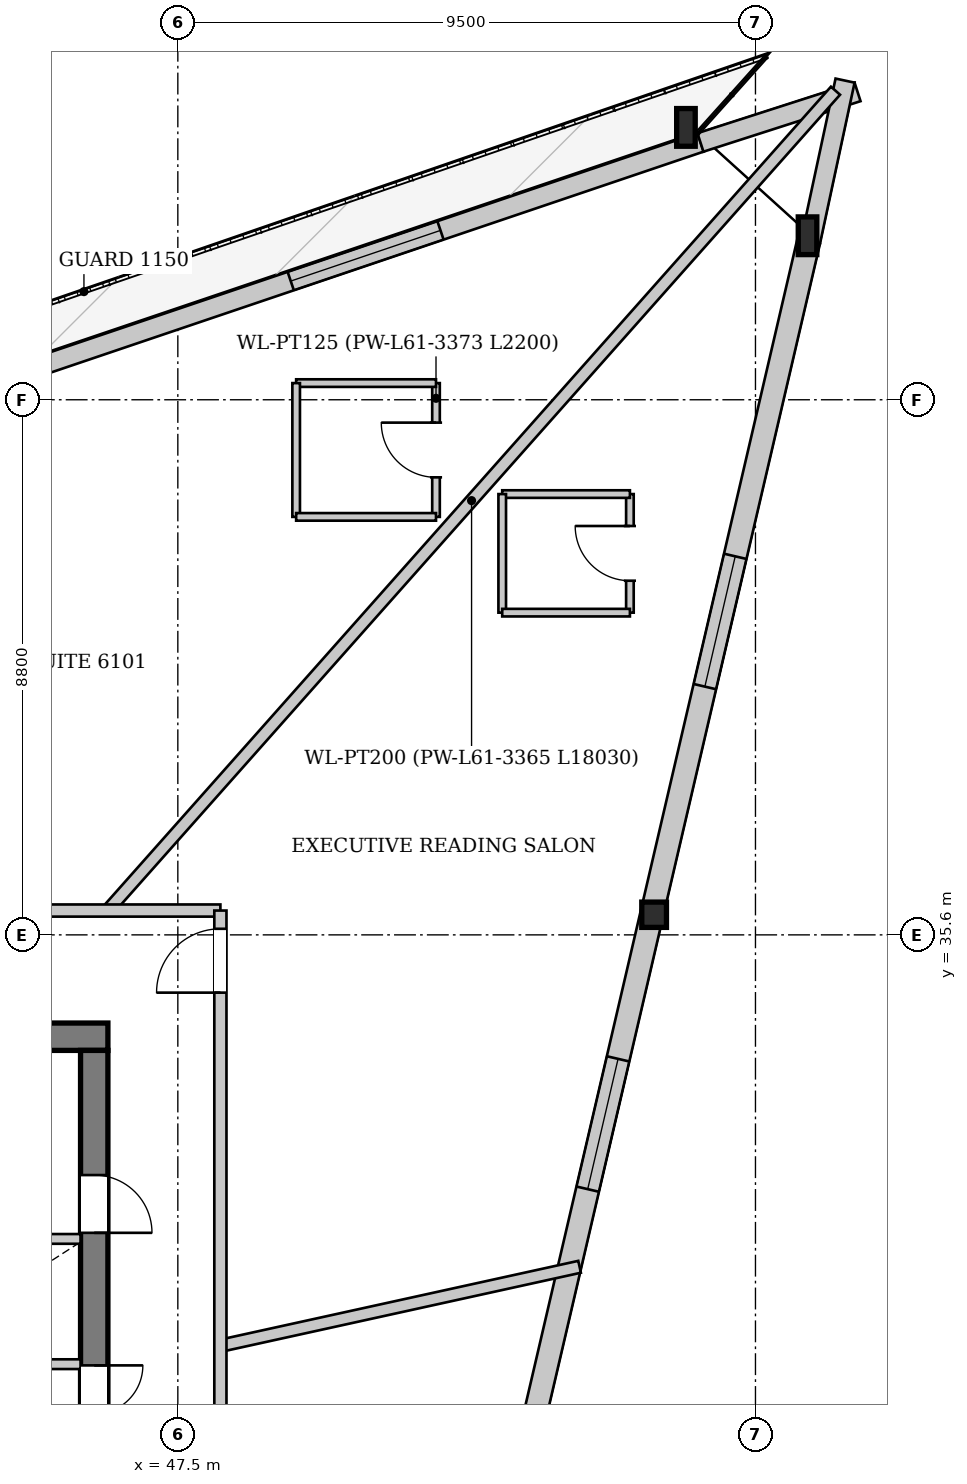
"""IFC4 building model, lengths in metres.
Left out: names, types, materials, properties, quantities, classifications, styles, units other than length and angle.
Written with IfcOpenShell. Run it as: python <this file> out.ifc"""

import sys

from ifc_helpers import new_model, si_unit, direction, frame, frame_2d, origin, origin_2d, place, context, subcontext, project, spatial, rectangle, i_section, extrude, source, transform, mapped, element, fill, save


model = new_model("IFC4")
c1 = context("Model", 3, precision=1e-05, world=origin(), true_north=direction((0.0, 1.0)))
c2 = subcontext(c1, "Body", "Model", "MODEL_VIEW")
j1 = project(units=[si_unit("LENGTHUNIT", "METRE"), si_unit("PLANEANGLEUNIT", "RADIAN")], contexts=[c1])
p1 = place(None, origin())
s1 = spatial("IfcSite", under=j1, at=p1, CompositionType="ELEMENT")
p2 = place(p1, origin())
s2 = spatial("IfcBuilding", under=s1, at=p2, CompositionType="ELEMENT")
p3 = place(p2, frame((0.0, 0.0, 230.9)))
s3 = spatial("IfcBuildingStorey", under=s2, at=p3, CompositionType="ELEMENT", Elevation=230.9)
m1 = source(origin(), c2, "Body", "SweptSolid", [
    extrude(i_section(OverallWidth=0.305, OverallDepth=0.62, WebThickness=0.021, FlangeThickness=0.04, at=origin_2d()), origin(), (0.0, 0.0, 1.0), 3.47),
])
p4 = place(p3, frame((58.06, 46.961, 0.0), z_axis=(-0.117364168692, 0.078313141339, 0.989996315044), x_axis=(-0.555045397528, -0.831820056673, 0.0)))
e1 = element("IfcColumn", 1, at=p4, inside=s3, PredefinedType="COLUMN", context=c2, shape_type="MappedRepresentation", body=[
    mapped(m1, transform((0.0, 0.0, 0.0), x_axis=(1.0, 0.0, 0.0), y_axis=(0.0, 1.0, 0.0), z_axis=(0.0, 0.0, 1.0), scale=1.0)),
])
m2 = source(origin(), c2, "Body", "SweptSolid", [
    extrude(i_section(OverallWidth=0.305, OverallDepth=0.62, WebThickness=0.021, FlangeThickness=0.04, at=origin_2d()), origin(), (0.0, 0.0, 1.0), 3.461),
])
p5 = place(p3, frame((56.046, 48.784, 0.0), z_axis=(-0.109545504942, 0.054808021468, 0.992469577937), x_axis=(-0.447443925033, -0.894311989158, 0.0)))
e2 = element("IfcColumn", 2, at=p5, inside=s3, PredefinedType="COLUMN", context=c2, shape_type="MappedRepresentation", body=[
    mapped(m2, transform((0.0, 0.0, 0.0), x_axis=(1.0, 0.0, 0.0), y_axis=(0.0, 1.0, 0.0), z_axis=(0.0, 0.0, 1.0), scale=1.0)),
])
m3 = source(origin(), c2, "Body", "SweptSolid", [
    extrude(i_section(OverallWidth=0.406, OverallDepth=0.416, WebThickness=0.027, FlangeThickness=0.042, at=origin_2d()), origin(), (0.0, 0.0, 1.0), 3.454),
])
p6 = place(p3, frame((55.457, 35.799, 0.0), z_axis=(-0.071883783203, 0.076195396552, 0.994498357594), x_axis=(-0.727387297644, -0.686227162991, 0.0)))
e3 = element("IfcColumn", 3, at=p6, inside=s3, PredefinedType="COLUMN", context=c2, shape_type="MappedRepresentation", body=[
    mapped(m3, transform((0.0, 0.0, 0.0), x_axis=(1.0, 0.0, 0.0), y_axis=(0.0, 1.0, 0.0), z_axis=(0.0, 0.0, 1.0), scale=1.0)),
])
p7 = place(p3, frame((34.909, 41.462, 0.0), z_axis=(0.0, 0.0, 1.0), x_axis=(0.947234987264, 0.320539980193, 0.0)))
e4 = element("IfcWall", 4, at=p7, inside=s3, PredefinedType="SOLIDWALL", context=c2, shape_type="SweptSolid", body=[
    extrude(rectangle(XDim=22.369, YDim=0.32, at=frame_2d((11.185, 0.0))), origin(), (0.0, 0.0, 1.0), 2.872),
])
p8 = place(p7, frame((6.408, 0.0, 0.0)))
e5 = element("IfcOpeningElement", 5, at=p8, cuts=e4, PredefinedType="OPENING", context=c2, shape_type="SweptSolid", body=[
    extrude(rectangle(XDim=1.5, YDim=2.3, at=frame_2d((0.75, 1.15))), frame((0.0, 0.17, 0.0), z_axis=(0.0, -1.0, 0.0), x_axis=(1.0, 0.0, 0.0)), (0.0, 0.0, 1.0), 0.34),
])
p9 = place(p7, frame((15.253, 0.0, 0.402)))
e6 = element("IfcOpeningElement", 6, at=p9, cuts=e4, PredefinedType="OPENING", context=c2, shape_type="SweptSolid", body=[
    extrude(rectangle(XDim=2.6, YDim=2.35, at=frame_2d((1.3, 1.175))), frame((0.0, 0.17, 0.0), z_axis=(0.0, -1.0, 0.0), x_axis=(1.0, 0.0, 0.0)), (0.0, 0.0, 1.0), 0.34),
])
p10 = place(p3, frame((56.095, 48.632, 0.0), z_axis=(0.0, 0.0, 1.0), x_axis=(0.951993925108, 0.306116916483, 0.0)))
e7 = element("IfcWall", 7, at=p10, inside=s3, PredefinedType="SOLIDWALL", context=c2, shape_type="SweptSolid", body=[
    extrude(rectangle(XDim=2.714, YDim=0.32, at=frame_2d((1.357, 0.0))), origin(), (0.0, 0.0, 1.0), 2.872),
])
p11 = place(p3, frame((58.474, 49.649, 0.0), z_axis=(0.0, 0.0, 1.0), x_axis=(-0.210020466506, -0.97769698969, 0.0)))
e8 = element("IfcWall", 8, at=p11, inside=s3, PredefinedType="SOLIDWALL", context=c2, shape_type="SweptSolid", body=[
    extrude(rectangle(XDim=2.714, YDim=0.32, at=frame_2d((1.357, 0.0))), origin(), (0.0, 0.0, 1.0), 2.872),
])
p12 = place(p3, frame((57.875, 47.004, 0.0), z_axis=(0.0, 0.0, 1.0), x_axis=(-0.227070358906, -0.973878355908, 0.0)))
e9 = element("IfcWall", 9, at=p12, inside=s3, PredefinedType="SOLIDWALL", context=c2, shape_type="SweptSolid", body=[
    extrude(rectangle(XDim=22.923, YDim=0.38, at=frame_2d((11.461, 0.0))), origin(), (0.0, 0.0, 1.0), 2.872),
])
p13 = place(p12, frame((5.318, 0.0, 0.502)))
e10 = element("IfcOpeningElement", 10, at=p13, cuts=e9, PredefinedType="OPENING", context=c2, shape_type="SweptSolid", body=[
    extrude(rectangle(XDim=2.2, YDim=2.25, at=frame_2d((1.1, 1.125))), frame((0.0, 0.2, 0.0), z_axis=(0.0, -1.0, 0.0), x_axis=(1.0, 0.0, 0.0)), (0.0, 0.0, 1.0), 0.4),
])
p14 = place(p12, frame((13.804, 0.0, 0.502)))
e11 = element("IfcOpeningElement", 11, at=p14, cuts=e9, PredefinedType="OPENING", context=c2, shape_type="SweptSolid", body=[
    extrude(rectangle(XDim=2.2, YDim=2.25, at=frame_2d((1.1, 1.125))), frame((0.0, 0.2, 0.0), z_axis=(0.0, -1.0, 0.0), x_axis=(1.0, 0.0, 0.0)), (0.0, 0.0, 1.0), 0.4),
])
p15 = place(p3, frame((29.65, 33.925, 0.0), z_axis=(0.0, 0.0, 1.0), x_axis=(1.0, 0.0, 0.0)))
e12 = element("IfcWall", 12, at=p15, inside=s3, PredefinedType="SHEAR", context=c2, shape_type="SweptSolid", body=[
    extrude(rectangle(XDim=16.7, YDim=0.45, at=frame_2d((8.35, 0.0))), origin(), (0.0, 0.0, 1.0), 3.38),
])
p16 = place(p15, frame((1.45, 0.0, 0.0)))
e13 = element("IfcOpeningElement", 13, at=p16, cuts=e12, PredefinedType="OPENING", context=c2, shape_type="SweptSolid", body=[
    extrude(rectangle(XDim=0.95, YDim=2.1, at=frame_2d((0.475, 1.05))), frame((0.0, 0.235, 0.0), z_axis=(0.0, -1.0, 0.0), x_axis=(1.0, 0.0, 0.0)), (0.0, 0.0, 1.0), 0.47),
])
p17 = place(p15, frame((3.83, 0.0, 0.0)))
e14 = element("IfcOpeningElement", 14, at=p17, cuts=e12, PredefinedType="OPENING", context=c2, shape_type="SweptSolid", body=[
    extrude(rectangle(XDim=1.32, YDim=2.2, at=frame_2d((0.66, 1.1))), frame((0.0, 0.235, 0.0), z_axis=(0.0, -1.0, 0.0), x_axis=(1.0, 0.0, 0.0)), (0.0, 0.0, 1.0), 0.47),
])
p18 = place(p3, frame((46.125, 33.7, 0.0), z_axis=(0.0, 0.0, 1.0), x_axis=(0.0, -1.0, 0.0)))
e15 = element("IfcWall", 15, at=p18, inside=s3, PredefinedType="SHEAR", context=c2, shape_type="SweptSolid", body=[
    extrude(rectangle(XDim=14.2, YDim=0.45, at=frame_2d((7.1, 0.0))), origin(), (0.0, 0.0, 1.0), 3.38),
])
p19 = place(p18, frame((5.18, 0.0, 0.0)))
e16 = element("IfcOpeningElement", 16, at=p19, cuts=e15, PredefinedType="OPENING", context=c2, shape_type="SweptSolid", body=[
    extrude(rectangle(XDim=1.6, YDim=2.2, at=frame_2d((0.8, 1.1))), frame((0.0, 0.235, 0.0), z_axis=(0.0, -1.0, 0.0), x_axis=(1.0, 0.0, 0.0)), (0.0, 0.0, 1.0), 0.47),
])
p20 = place(p18, frame((2.05, 0.0, 0.0)))
e17 = element("IfcOpeningElement", 17, at=p20, cuts=e15, PredefinedType="OPENING", context=c2, shape_type="SweptSolid", body=[
    extrude(rectangle(XDim=0.95, YDim=2.1, at=frame_2d((0.475, 1.05))), frame((0.0, 0.235, 0.0), z_axis=(0.0, -1.0, 0.0), x_axis=(1.0, 0.0, 0.0)), (0.0, 0.0, 1.0), 0.47),
])
p21 = place(p3, frame((33.28, 28.54, 0.0), z_axis=(0.0, 0.0, 1.0), x_axis=(1.0, 0.0, 0.0)))
e18 = element("IfcWall", 18, at=p21, inside=s3, PredefinedType="PARTITIONING", context=c2, shape_type="SweptSolid", body=[
    extrude(rectangle(XDim=12.62, YDim=0.16, at=frame_2d((6.31, 0.0))), origin(), (0.0, 0.0, 1.0), 3.38),
])
p22 = place(p21, frame((0.26, 0.0, 0.0)))
e19 = element("IfcOpeningElement", 19, at=p22, cuts=e18, PredefinedType="OPENING", context=c2, shape_type="SweptSolid", body=[
    extrude(rectangle(XDim=1.1, YDim=2.2, at=frame_2d((0.55, 1.1))), frame((0.0, 0.09, 0.0), z_axis=(0.0, -1.0, 0.0), x_axis=(1.0, 0.0, 0.0)), (0.0, 0.0, 1.0), 0.18),
])
p23 = place(p21, frame((2.01, 0.0, 0.0)))
e20 = element("IfcOpeningElement", 20, at=p23, cuts=e18, PredefinedType="OPENING", context=c2, shape_type="SweptSolid", body=[
    extrude(rectangle(XDim=1.1, YDim=2.2, at=frame_2d((0.55, 1.1))), frame((0.0, 0.09, 0.0), z_axis=(0.0, -1.0, 0.0), x_axis=(1.0, 0.0, 0.0)), (0.0, 0.0, 1.0), 0.18),
])
p24 = place(p21, frame((3.76, 0.0, 0.0)))
e21 = element("IfcOpeningElement", 21, at=p24, cuts=e18, PredefinedType="OPENING", context=c2, shape_type="SweptSolid", body=[
    extrude(rectangle(XDim=1.1, YDim=2.2, at=frame_2d((0.55, 1.1))), frame((0.0, 0.09, 0.0), z_axis=(0.0, -1.0, 0.0), x_axis=(1.0, 0.0, 0.0)), (0.0, 0.0, 1.0), 0.18),
])
p25 = place(p3, frame((40.72, 30.6, 0.0), z_axis=(0.0, 0.0, 1.0), x_axis=(1.0, 0.0, 0.0)))
e22 = element("IfcWall", 22, at=p25, inside=s3, PredefinedType="PARTITIONING", context=c2, shape_type="SweptSolid", body=[
    extrude(rectangle(XDim=5.18, YDim=0.16, at=frame_2d((2.59, 0.0))), origin(), (0.0, 0.0, 1.0), 3.38),
])
p26 = place(p3, frame((46.346, 36.0, 0.0), z_axis=(0.0, 0.0, 1.0), x_axis=(0.663932561703, 0.747792453499, 0.0)))
e23 = element("IfcWall", 23, at=p26, inside=s3, PredefinedType="PARTITIONING", context=c2, shape_type="SweptSolid", body=[
    extrude(rectangle(XDim=18.03, YDim=0.2, at=frame_2d((9.015, 0.0))), origin(), (0.0, 0.0, 1.0), 2.975),
])
p27 = place(p3, frame((48.2, 28.843, 0.0), z_axis=(0.0, 0.0, 1.0), x_axis=(0.976672748027, 0.214733190871, 0.0)))
e24 = element("IfcWall", 24, at=p27, inside=s3, PredefinedType="PARTITIONING", context=c2, shape_type="SweptSolid", body=[
    extrude(rectangle(XDim=6.049, YDim=0.2, at=frame_2d((3.024, 0.0))), origin(), (0.0, 0.0, 1.0), 3.38),
])
p28 = place(p3, frame((51.746, 42.474, 0.0), z_axis=(0.0, 0.0, 1.0), x_axis=(0.0, 1.0, 0.0)))
e25 = element("IfcWall", 25, at=p28, inside=s3, PredefinedType="PARTITIONING", context=c2, shape_type="SweptSolid", body=[
    extrude(rectangle(XDim=2.2, YDim=0.125, at=frame_2d((1.1, 0.0))), origin(), (0.0, 0.0, 1.0), 3.38),
])
p29 = place(p28, frame((0.65, 0.0, 0.0)))
e26 = element("IfcOpeningElement", 26, at=p29, cuts=e25, PredefinedType="OPENING", context=c2, shape_type="SweptSolid", body=[
    extrude(rectangle(XDim=0.9, YDim=2.1, at=frame_2d((0.45, 1.05))), frame((0.0, 0.073, 0.0), z_axis=(0.0, -1.0, 0.0), x_axis=(1.0, 0.0, 0.0)), (0.0, 0.0, 1.0), 0.145),
])
p30 = place(p3, frame((51.746, 44.674, 0.0), z_axis=(0.0, 0.0, 1.0), x_axis=(-1.0, 0.0, 0.0)))
e27 = element("IfcWall", 27, at=p30, inside=s3, PredefinedType="PARTITIONING", context=c2, shape_type="SweptSolid", body=[
    extrude(rectangle(XDim=2.3, YDim=0.125, at=frame_2d((1.15, 0.0))), origin(), (0.0, 0.0, 1.0), 3.38),
])
p31 = place(p3, frame((49.446, 44.674, 0.0), z_axis=(0.0, 0.0, 1.0), x_axis=(0.0, -1.0, 0.0)))
e28 = element("IfcWall", 28, at=p31, inside=s3, PredefinedType="PARTITIONING", context=c2, shape_type="SweptSolid", body=[
    extrude(rectangle(XDim=2.2, YDim=0.125, at=frame_2d((1.1, 0.0))), origin(), (0.0, 0.0, 1.0), 3.38),
])
p32 = place(p3, frame((49.446, 42.474, 0.0), z_axis=(0.0, 0.0, 1.0), x_axis=(1.0, 0.0, 0.0)))
e29 = element("IfcWall", 29, at=p32, inside=s3, PredefinedType="PARTITIONING", context=c2, shape_type="SweptSolid", body=[
    extrude(rectangle(XDim=2.3, YDim=0.125, at=frame_2d((1.15, 0.0))), origin(), (0.0, 0.0, 1.0), 3.065),
])
p33 = place(p3, frame((54.935, 40.899, 0.0), z_axis=(0.0, 0.0, 1.0), x_axis=(0.0, 1.0, 0.0)))
e30 = element("IfcWall", 30, at=p33, inside=s3, PredefinedType="PARTITIONING", context=c2, shape_type="SweptSolid", body=[
    extrude(rectangle(XDim=1.95, YDim=0.125, at=frame_2d((0.975, 0.0))), origin(), (0.0, 0.0, 1.0), 3.38),
])
p34 = place(p33, frame((0.525, 0.0, 0.0)))
e31 = element("IfcOpeningElement", 31, at=p34, cuts=e30, PredefinedType="OPENING", context=c2, shape_type="SweptSolid", body=[
    extrude(rectangle(XDim=0.9, YDim=2.1, at=frame_2d((0.45, 1.05))), frame((0.0, 0.073, 0.0), z_axis=(0.0, -1.0, 0.0), x_axis=(1.0, 0.0, 0.0)), (0.0, 0.0, 1.0), 0.145),
])
p35 = place(p3, frame((54.935, 42.849, 0.0), z_axis=(0.0, 0.0, 1.0), x_axis=(-1.0, 0.0, 0.0)))
e32 = element("IfcWall", 32, at=p35, inside=s3, PredefinedType="PARTITIONING", context=c2, shape_type="SweptSolid", body=[
    extrude(rectangle(XDim=2.1, YDim=0.125, at=frame_2d((1.05, 0.0))), origin(), (0.0, 0.0, 1.0), 3.38),
])
p36 = place(p3, frame((52.835, 42.849, 0.0), z_axis=(0.0, 0.0, 1.0), x_axis=(0.0, -1.0, 0.0)))
e33 = element("IfcWall", 33, at=p36, inside=s3, PredefinedType="PARTITIONING", context=c2, shape_type="SweptSolid", body=[
    extrude(rectangle(XDim=1.95, YDim=0.125, at=frame_2d((0.975, 0.0))), origin(), (0.0, 0.0, 1.0), 3.38),
])
p37 = place(p3, frame((52.835, 40.899, 0.0), z_axis=(0.0, 0.0, 1.0), x_axis=(1.0, 0.0, 0.0)))
e34 = element("IfcWall", 34, at=p37, inside=s3, PredefinedType="PARTITIONING", context=c2, shape_type="SweptSolid", body=[
    extrude(rectangle(XDim=2.1, YDim=0.125, at=frame_2d((1.05, 0.0))), origin(), (0.0, 0.0, 1.0), 3.38),
])
p38 = place(p3, frame((43.4, 36.0, 0.0), z_axis=(0.0, 0.0, 1.0), x_axis=(1.0, 0.0, 0.0)))
e35 = element("IfcWall", 35, at=p38, inside=s3, PredefinedType="PARTITIONING", context=c2, shape_type="SweptSolid", body=[
    extrude(rectangle(XDim=4.8, YDim=0.2, at=frame_2d((2.4, 0.0))), origin(), (0.0, 0.0, 1.0), 3.38),
])
p39 = place(p3, frame((48.2, 17.2, 0.0), z_axis=(0.0, 0.0, 1.0), x_axis=(0.0, 1.0, 0.0)))
e36 = element("IfcWall", 36, at=p39, inside=s3, PredefinedType="PARTITIONING", context=c2, shape_type="SweptSolid", body=[
    extrude(rectangle(XDim=18.8, YDim=0.2, at=frame_2d((9.4, 0.0))), origin(), (0.0, 0.0, 1.0), 3.005),
])
p40 = place(p39, frame((4.261, 0.0, 0.0)))
e37 = element("IfcOpeningElement", 37, at=p40, cuts=e36, PredefinedType="OPENING", context=c2, shape_type="SweptSolid", body=[
    extrude(rectangle(XDim=1.05, YDim=2.2, at=frame_2d((0.525, 1.1))), frame((0.0, 0.11, 0.0), z_axis=(0.0, -1.0, 0.0), x_axis=(1.0, 0.0, 0.0)), (0.0, 0.0, 1.0), 0.22),
])
p41 = place(p39, frame((17.45, 0.0, 0.0)))
e38 = element("IfcOpeningElement", 38, at=p41, cuts=e36, PredefinedType="OPENING", context=c2, shape_type="SweptSolid", body=[
    extrude(rectangle(XDim=1.05, YDim=2.2, at=frame_2d((0.525, 1.1))), frame((0.0, 0.11, 0.0), z_axis=(0.0, -1.0, 0.0), x_axis=(1.0, 0.0, 0.0)), (0.0, 0.0, 1.0), 0.22),
])
m4 = source(origin(), c2, "Body", "SweptSolid", [
    extrude(rectangle(XDim=2.6, YDim=2.35, at=frame_2d((1.3, 1.175))), frame((0.0, 0.03, 0.0), z_axis=(0.0, -1.0, 0.0), x_axis=(1.0, 0.0, 0.0)), (0.0, 0.0, 1.0), 0.06),
])
p42 = place(p9, origin())
e39 = element("IfcWindow", 39, at=p42, inside=s3, PartitioningType="SINGLE_PANEL", PredefinedType="WINDOW", context=c2, shape_type="MappedRepresentation", body=[
    mapped(m4, transform((0.0, 0.0, 0.0), x_axis=(1.0, 0.0, 0.0), y_axis=(0.0, 1.0, 0.0), z_axis=(0.0, 0.0, 1.0), scale=1.0)),
])
fill(e6, e39)
m5 = source(origin(), c2, "Body", "SweptSolid", [
    extrude(rectangle(XDim=2.2, YDim=2.25, at=frame_2d((1.1, 1.125))), frame((0.0, 0.03, 0.0), z_axis=(0.0, -1.0, 0.0), x_axis=(1.0, 0.0, 0.0)), (0.0, 0.0, 1.0), 0.06),
])
p43 = place(p13, origin())
e40 = element("IfcWindow", 40, at=p43, inside=s3, PartitioningType="SINGLE_PANEL", PredefinedType="WINDOW", context=c2, shape_type="MappedRepresentation", body=[
    mapped(m5, transform((0.0, 0.0, 0.0), x_axis=(1.0, 0.0, 0.0), y_axis=(0.0, 1.0, 0.0), z_axis=(0.0, 0.0, 1.0), scale=1.0)),
])
fill(e10, e40)
p44 = place(p14, origin())
e41 = element("IfcWindow", 41, at=p44, inside=s3, PartitioningType="SINGLE_PANEL", PredefinedType="WINDOW", context=c2, shape_type="MappedRepresentation", body=[
    mapped(m5, transform((0.0, 0.0, 0.0), x_axis=(1.0, 0.0, 0.0), y_axis=(0.0, 1.0, 0.0), z_axis=(0.0, 0.0, 1.0), scale=1.0)),
])
fill(e11, e41)
m6 = source(origin(), c2, "Body", "SweptSolid", [
    extrude(rectangle(XDim=1.6, YDim=2.2, at=frame_2d((0.8, 1.1))), frame((0.0, 0.025, 0.0), z_axis=(0.0, -1.0, 0.0), x_axis=(1.0, 0.0, 0.0)), (0.0, 0.0, 1.0), 0.05),
])
p45 = place(p19, origin())
e42 = element("IfcDoor", 42, at=p45, inside=s3, OperationType="DOUBLE_DOOR_SINGLE_SWING", PredefinedType="DOOR", context=c2, shape_type="MappedRepresentation", body=[
    mapped(m6, transform((0.0, 0.0, 0.0), x_axis=(1.0, 0.0, 0.0), y_axis=(0.0, 1.0, 0.0), z_axis=(0.0, 0.0, 1.0), scale=1.0)),
])
fill(e16, e42)
m7 = source(origin(), c2, "Body", "SweptSolid", [
    extrude(rectangle(XDim=0.95, YDim=2.1, at=frame_2d((0.475, 1.05))), frame((0.0, 0.025, 0.0), z_axis=(0.0, -1.0, 0.0), x_axis=(1.0, 0.0, 0.0)), (0.0, 0.0, 1.0), 0.05),
])
p46 = place(p20, origin())
e43 = element("IfcDoor", 43, at=p46, inside=s3, OperationType="SINGLE_SWING_RIGHT", PredefinedType="DOOR", context=c2, shape_type="MappedRepresentation", body=[
    mapped(m7, transform((0.0, 0.0, 0.0), x_axis=(1.0, 0.0, 0.0), y_axis=(0.0, 1.0, 0.0), z_axis=(0.0, 0.0, 1.0), scale=1.0)),
])
fill(e17, e43)
m8 = source(origin(), c2, "Body", "SweptSolid", [
    extrude(rectangle(XDim=0.9, YDim=2.1, at=frame_2d((0.45, 1.05))), frame((0.0, 0.025, 0.0), z_axis=(0.0, -1.0, 0.0), x_axis=(1.0, 0.0, 0.0)), (0.0, 0.0, 1.0), 0.05),
])
p47 = place(p29, origin())
e44 = element("IfcDoor", 44, at=p47, inside=s3, OperationType="SINGLE_SWING_RIGHT", PredefinedType="DOOR", context=c2, shape_type="MappedRepresentation", body=[
    mapped(m8, transform((0.0, 0.0, 0.0), x_axis=(1.0, 0.0, 0.0), y_axis=(0.0, 1.0, 0.0), z_axis=(0.0, 0.0, 1.0), scale=1.0)),
])
fill(e26, e44)
p48 = place(p34, origin())
e45 = element("IfcDoor", 45, at=p48, inside=s3, OperationType="SINGLE_SWING_RIGHT", PredefinedType="DOOR", context=c2, shape_type="MappedRepresentation", body=[
    mapped(m8, transform((0.0, 0.0, 0.0), x_axis=(1.0, 0.0, 0.0), y_axis=(0.0, 1.0, 0.0), z_axis=(0.0, 0.0, 1.0), scale=1.0)),
])
fill(e31, e45)
m9 = source(origin(), c2, "Body", "SweptSolid", [
    extrude(rectangle(XDim=1.05, YDim=2.2, at=frame_2d((0.525, 1.1))), frame((0.0, 0.025, 0.0), z_axis=(0.0, -1.0, 0.0), x_axis=(1.0, 0.0, 0.0)), (0.0, 0.0, 1.0), 0.05),
])
p49 = place(p41, origin())
e46 = element("IfcDoor", 46, at=p49, inside=s3, OperationType="SINGLE_SWING_LEFT", PredefinedType="DOOR", context=c2, shape_type="MappedRepresentation", body=[
    mapped(m9, transform((0.0, 0.0, 0.0), x_axis=(1.0, 0.0, 0.0), y_axis=(0.0, 1.0, 0.0), z_axis=(0.0, 0.0, 1.0), scale=1.0)),
])
fill(e38, e46)
save(model, sys.argv[1])
